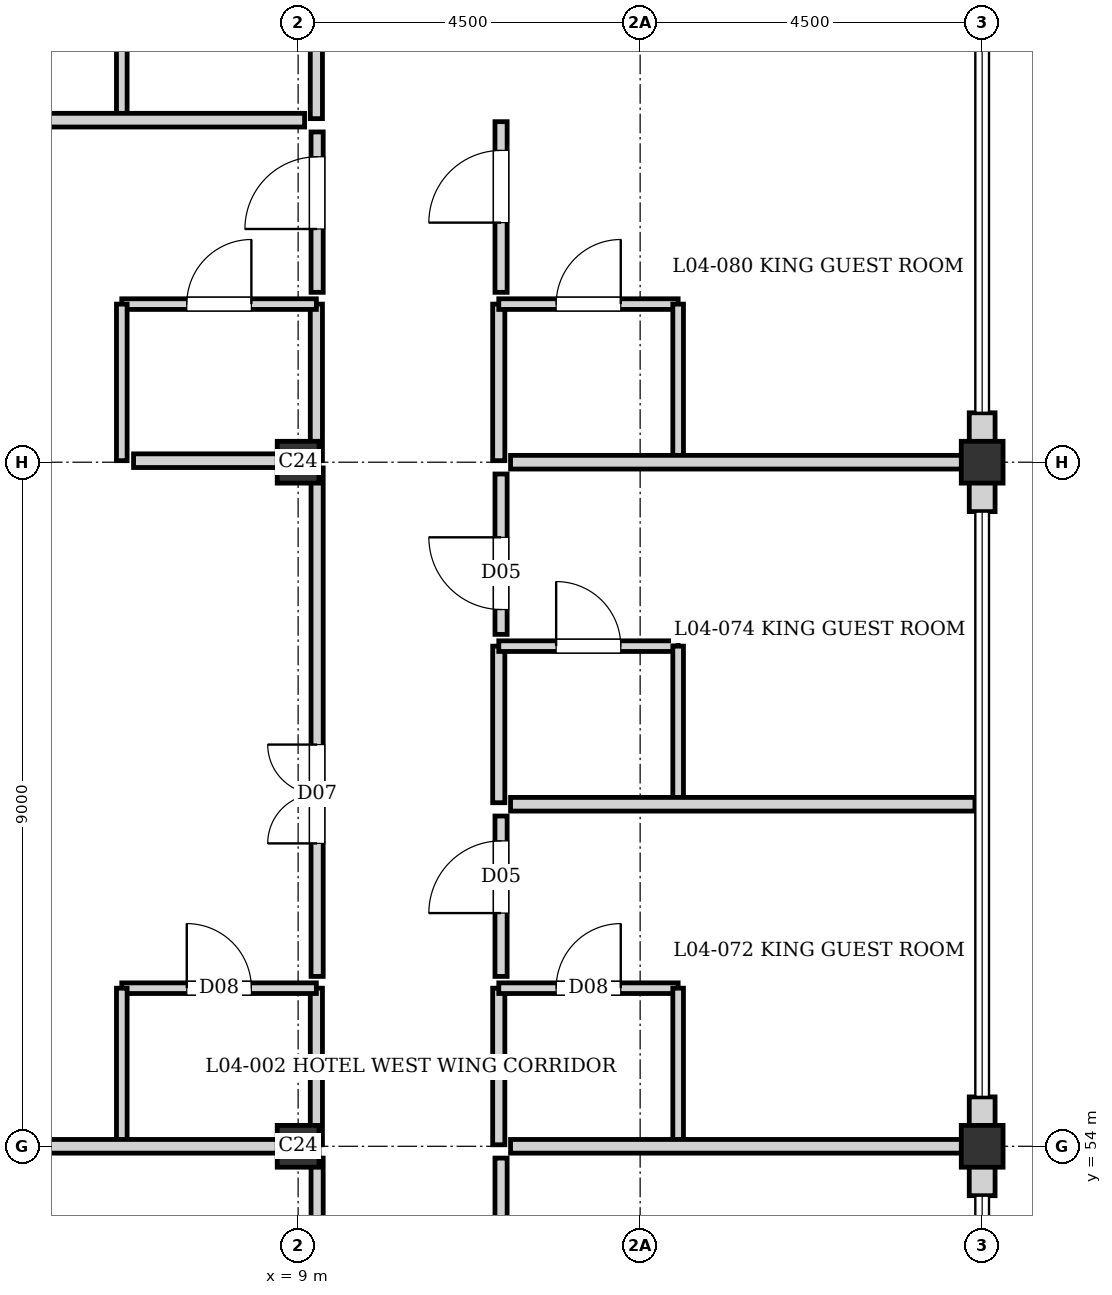
"""IFC4 building model, lengths in metres.
Left out: names, types, materials, properties, quantities, classifications, styles, units other than length and angle.
Written with IfcOpenShell. Run it as: python <this file> out.ifc"""

import sys

from ifc_helpers import new_model, si_unit, direction, frame, frame_2d, origin, origin_2d, place, context, subcontext, project, spatial, rectangle, extrude, element, fill, save


model = new_model("IFC4")
c1 = context("Model", 3, precision=1e-05, world=origin(), true_north=direction((0.0, 1.0)))
c2 = subcontext(c1, "Body", "Model", "MODEL_VIEW")
j1 = project(units=[si_unit("LENGTHUNIT", "METRE"), si_unit("PLANEANGLEUNIT", "RADIAN")], contexts=[c1])
p1 = place(None, origin())
s1 = spatial("IfcSite", under=j1, at=p1, CompositionType="ELEMENT")
p2 = place(p1, origin())
s2 = spatial("IfcBuilding", under=s1, at=p2, CompositionType="ELEMENT")
p3 = place(p2, frame((0.0, 0.0, 14.56)))
s3 = spatial("IfcBuildingStorey", under=s2, at=p3, CompositionType="ELEMENT", Elevation=14.56)
for number, where, z_axis, x_axis in (
    (1, (9.0, 54.0, 0.0), (0.0, 0.0, 1.0), (1.0, 0.0, 0.0)),
    (2, (9.0, 63.0, 0.0), (0.0, 0.0, 1.0), (1.0, 0.0, 0.0)),
    (3, (18.0, 54.0, 0.0), (0.0, 0.0, 1.0), (1.0, 0.0, 0.0)),
    (4, (18.0, 63.0, 0.0), (0.0, 0.0, 1.0), (1.0, 0.0, 0.0)),
):
    element("IfcColumn", number, at=place(p3, frame(where, z_axis=z_axis, x_axis=x_axis)), inside=s3, PredefinedType="COLUMN", context=c2, shape_type="SweptSolid", body=[
        extrude(rectangle(XDim=0.55, YDim=0.55, at=origin_2d()), origin(), (0.0, 0.0, 1.0), 3.04),
    ])
p4 = place(p3, frame((18.0, 63.65, 0.0), z_axis=(0.0, 0.0, 1.0), x_axis=(0.0, -1.0, 0.0)))
e5 = element("IfcWall", 5, at=p4, inside=s3, PredefinedType="SOLIDWALL", context=c2, shape_type="SweptSolid", body=[
    extrude(rectangle(XDim=0.65, YDim=0.34, at=frame_2d((0.325, 0.0))), origin(), (0.0, 0.0, 1.0), 2.42),
])
for number, where, z_axis, x_axis in (
    (6, (18.0, 63.0, 0.0), (0.0, 0.0, 1.0), (0.0, -1.0, 0.0)),
    (7, (18.0, 54.65, 0.0), (0.0, 0.0, 1.0), (0.0, -1.0, 0.0)),
):
    element("IfcWall", number, at=place(p3, frame(where, z_axis=z_axis, x_axis=x_axis)), inside=s3, PredefinedType="SOLIDWALL", context=c2, shape_type="SweptSolid", body=[
        extrude(rectangle(XDim=0.65, YDim=0.34, at=frame_2d((0.325, 0.0))), origin(), (0.0, 0.0, 1.0), 2.48),
    ])
p5 = place(p3, frame((18.0, 54.0, 0.0), z_axis=(0.0, 0.0, 1.0), x_axis=(0.0, -1.0, 0.0)))
e8 = element("IfcWall", 8, at=p5, inside=s3, PredefinedType="SOLIDWALL", context=c2, shape_type="SweptSolid", body=[
    extrude(rectangle(XDim=0.65, YDim=0.34, at=frame_2d((0.325, 0.0))), origin(), (0.0, 0.0, 1.0), 2.82),
])
p6 = place(p3, frame((9.24, 54.02, 0.0), z_axis=(0.0, 0.0, 1.0), x_axis=(0.0, 1.0, 0.0)))
e9 = element("IfcWall", 9, at=p6, inside=s3, PredefinedType="PARTITIONING", context=c2, shape_type="SweptSolid", body=[
    extrude(rectangle(XDim=2.06, YDim=0.16, at=frame_2d((1.03, 0.0))), origin(), (0.0, 0.0, 1.0), 2.82),
])
p7 = place(p3, frame((6.68, 56.08, 0.0), z_axis=(0.0, 0.0, 1.0), x_axis=(1.0, 0.0, 0.0)))
e10 = element("IfcWall", 10, at=p7, inside=s3, PredefinedType="PLUMBINGWALL", context=c2, shape_type="SweptSolid", body=[
    extrude(rectangle(XDim=2.56, YDim=0.14, at=frame_2d((1.28, 0.0))), origin(), (0.0, 0.0, 1.0), 2.82),
])
p8 = place(p7, frame((0.855, 0.0, 0.0)))
e11 = element("IfcOpeningElement", 11, at=p8, cuts=e10, PredefinedType="OPENING", context=c2, shape_type="SweptSolid", body=[
    extrude(rectangle(XDim=0.85, YDim=2.04, at=frame_2d((0.425, 1.02))), frame((0.0, 0.08, 0.0), z_axis=(0.0, -1.0, 0.0), x_axis=(1.0, 0.0, 0.0)), (0.0, 0.0, 1.0), 0.16),
])
p9 = place(p3, frame((6.68, 54.02, 0.0), z_axis=(0.0, 0.0, 1.0), x_axis=(0.0, 1.0, 0.0)))
e12 = element("IfcWall", 12, at=p9, inside=s3, PredefinedType="PLUMBINGWALL", context=c2, shape_type="SweptSolid", body=[
    extrude(rectangle(XDim=2.06, YDim=0.14, at=frame_2d((1.03, 0.0))), origin(), (0.0, 0.0, 1.0), 2.82),
])
p10 = place(p3, frame((11.64, 54.02, 0.0), z_axis=(0.0, 0.0, 1.0), x_axis=(0.0, 1.0, 0.0)))
e13 = element("IfcWall", 13, at=p10, inside=s3, PredefinedType="PARTITIONING", context=c2, shape_type="SweptSolid", body=[
    extrude(rectangle(XDim=2.06, YDim=0.16, at=frame_2d((1.03, 0.0))), origin(), (0.0, 0.0, 1.0), 2.82),
])
p11 = place(p3, frame((11.64, 56.08, 0.0), z_axis=(0.0, 0.0, 1.0), x_axis=(1.0, 0.0, 0.0)))
e14 = element("IfcWall", 14, at=p11, inside=s3, PredefinedType="PLUMBINGWALL", context=c2, shape_type="SweptSolid", body=[
    extrude(rectangle(XDim=2.36, YDim=0.14, at=frame_2d((1.18, 0.0))), origin(), (0.0, 0.0, 1.0), 2.82),
])
p12 = place(p11, frame((0.755, 0.0, 0.0)))
e15 = element("IfcOpeningElement", 15, at=p12, cuts=e14, PredefinedType="OPENING", context=c2, shape_type="SweptSolid", body=[
    extrude(rectangle(XDim=0.85, YDim=2.04, at=frame_2d((0.425, 1.02))), frame((0.0, 0.08, 0.0), z_axis=(0.0, -1.0, 0.0), x_axis=(1.0, 0.0, 0.0)), (0.0, 0.0, 1.0), 0.16),
])
p13 = place(p3, frame((14.0, 54.02, 0.0), z_axis=(0.0, 0.0, 1.0), x_axis=(0.0, 1.0, 0.0)))
e16 = element("IfcWall", 16, at=p13, inside=s3, PredefinedType="PLUMBINGWALL", context=c2, shape_type="SweptSolid", body=[
    extrude(rectangle(XDim=2.06, YDim=0.14, at=frame_2d((1.03, 0.0))), origin(), (0.0, 0.0, 1.0), 2.82),
])
p14 = place(p3, frame((11.64, 58.52, 0.0), z_axis=(0.0, 0.0, 1.0), x_axis=(0.0, 1.0, 0.0)))
e17 = element("IfcWall", 17, at=p14, inside=s3, PredefinedType="PARTITIONING", context=c2, shape_type="SweptSolid", body=[
    extrude(rectangle(XDim=2.06, YDim=0.16, at=frame_2d((1.03, 0.0))), origin(), (0.0, 0.0, 1.0), 2.82),
])
p15 = place(p3, frame((11.64, 60.58, 0.0), z_axis=(0.0, 0.0, 1.0), x_axis=(1.0, 0.0, 0.0)))
e18 = element("IfcWall", 18, at=p15, inside=s3, PredefinedType="PLUMBINGWALL", context=c2, shape_type="SweptSolid", body=[
    extrude(rectangle(XDim=2.36, YDim=0.14, at=frame_2d((1.18, 0.0))), origin(), (0.0, 0.0, 1.0), 2.82),
])
p16 = place(p15, frame((0.755, 0.0, 0.0)))
e19 = element("IfcOpeningElement", 19, at=p16, cuts=e18, PredefinedType="OPENING", context=c2, shape_type="SweptSolid", body=[
    extrude(rectangle(XDim=0.85, YDim=2.04, at=frame_2d((0.425, 1.02))), frame((0.0, 0.08, 0.0), z_axis=(0.0, -1.0, 0.0), x_axis=(1.0, 0.0, 0.0)), (0.0, 0.0, 1.0), 0.16),
])
p17 = place(p3, frame((14.0, 58.52, 0.0), z_axis=(0.0, 0.0, 1.0), x_axis=(0.0, 1.0, 0.0)))
e20 = element("IfcWall", 20, at=p17, inside=s3, PredefinedType="PLUMBINGWALL", context=c2, shape_type="SweptSolid", body=[
    extrude(rectangle(XDim=2.06, YDim=0.14, at=frame_2d((1.03, 0.0))), origin(), (0.0, 0.0, 1.0), 2.82),
])
p18 = place(p3, frame((9.24, 63.02, 0.0), z_axis=(0.0, 0.0, 1.0), x_axis=(0.0, 1.0, 0.0)))
e21 = element("IfcWall", 21, at=p18, inside=s3, PredefinedType="PARTITIONING", context=c2, shape_type="SweptSolid", body=[
    extrude(rectangle(XDim=2.06, YDim=0.16, at=frame_2d((1.03, 0.0))), origin(), (0.0, 0.0, 1.0), 2.82),
])
p19 = place(p3, frame((6.68, 65.08, 0.0), z_axis=(0.0, 0.0, 1.0), x_axis=(1.0, 0.0, 0.0)))
e22 = element("IfcWall", 22, at=p19, inside=s3, PredefinedType="PLUMBINGWALL", context=c2, shape_type="SweptSolid", body=[
    extrude(rectangle(XDim=2.56, YDim=0.14, at=frame_2d((1.28, 0.0))), origin(), (0.0, 0.0, 1.0), 2.82),
])
p20 = place(p19, frame((0.855, 0.0, 0.0)))
e23 = element("IfcOpeningElement", 23, at=p20, cuts=e22, PredefinedType="OPENING", context=c2, shape_type="SweptSolid", body=[
    extrude(rectangle(XDim=0.85, YDim=2.04, at=frame_2d((0.425, 1.02))), frame((0.0, 0.08, 0.0), z_axis=(0.0, -1.0, 0.0), x_axis=(1.0, 0.0, 0.0)), (0.0, 0.0, 1.0), 0.16),
])
p21 = place(p3, frame((6.68, 63.02, 0.0), z_axis=(0.0, 0.0, 1.0), x_axis=(0.0, 1.0, 0.0)))
e24 = element("IfcWall", 24, at=p21, inside=s3, PredefinedType="PLUMBINGWALL", context=c2, shape_type="SweptSolid", body=[
    extrude(rectangle(XDim=2.06, YDim=0.14, at=frame_2d((1.03, 0.0))), origin(), (0.0, 0.0, 1.0), 2.82),
])
p22 = place(p3, frame((9.24, 67.52, 0.0), z_axis=(0.0, 0.0, 1.0), x_axis=(0.0, 1.0, 0.0)))
e25 = element("IfcWall", 25, at=p22, inside=s3, PredefinedType="PARTITIONING", context=c2, shape_type="SweptSolid", body=[
    extrude(rectangle(XDim=2.06, YDim=0.16, at=frame_2d((1.03, 0.0))), origin(), (0.0, 0.0, 1.0), 2.82),
])
p23 = place(p3, frame((6.68, 67.52, 0.0), z_axis=(0.0, 0.0, 1.0), x_axis=(0.0, 1.0, 0.0)))
e26 = element("IfcWall", 26, at=p23, inside=s3, PredefinedType="PLUMBINGWALL", context=c2, shape_type="SweptSolid", body=[
    extrude(rectangle(XDim=2.06, YDim=0.14, at=frame_2d((1.03, 0.0))), origin(), (0.0, 0.0, 1.0), 2.82),
])
p24 = place(p3, frame((11.64, 63.02, 0.0), z_axis=(0.0, 0.0, 1.0), x_axis=(0.0, 1.0, 0.0)))
e27 = element("IfcWall", 27, at=p24, inside=s3, PredefinedType="PARTITIONING", context=c2, shape_type="SweptSolid", body=[
    extrude(rectangle(XDim=2.06, YDim=0.16, at=frame_2d((1.03, 0.0))), origin(), (0.0, 0.0, 1.0), 2.82),
])
p25 = place(p3, frame((11.64, 65.08, 0.0), z_axis=(0.0, 0.0, 1.0), x_axis=(1.0, 0.0, 0.0)))
e28 = element("IfcWall", 28, at=p25, inside=s3, PredefinedType="PLUMBINGWALL", context=c2, shape_type="SweptSolid", body=[
    extrude(rectangle(XDim=2.36, YDim=0.14, at=frame_2d((1.18, 0.0))), origin(), (0.0, 0.0, 1.0), 2.82),
])
p26 = place(p25, frame((0.755, 0.0, 0.0)))
e29 = element("IfcOpeningElement", 29, at=p26, cuts=e28, PredefinedType="OPENING", context=c2, shape_type="SweptSolid", body=[
    extrude(rectangle(XDim=0.85, YDim=2.04, at=frame_2d((0.425, 1.02))), frame((0.0, 0.08, 0.0), z_axis=(0.0, -1.0, 0.0), x_axis=(1.0, 0.0, 0.0)), (0.0, 0.0, 1.0), 0.16),
])
p27 = place(p3, frame((14.0, 63.02, 0.0), z_axis=(0.0, 0.0, 1.0), x_axis=(0.0, 1.0, 0.0)))
e30 = element("IfcWall", 30, at=p27, inside=s3, PredefinedType="PLUMBINGWALL", context=c2, shape_type="SweptSolid", body=[
    extrude(rectangle(XDim=2.06, YDim=0.14, at=frame_2d((1.03, 0.0))), origin(), (0.0, 0.0, 1.0), 2.82),
])
p28 = place(p3, frame((0.195, 54.0, 0.0), z_axis=(0.0, 0.0, 1.0), x_axis=(1.0, 0.0, 0.0)))
e31 = element("IfcWall", 31, at=p28, inside=s3, PredefinedType="PARTITIONING", context=c2, shape_type="SweptSolid", body=[
    extrude(rectangle(XDim=8.89, YDim=0.18, at=frame_2d((4.445, 0.0))), origin(), (0.0, 0.0, 1.0), 2.42),
])
p29 = place(p3, frame((11.795, 54.0, 0.0), z_axis=(0.0, 0.0, 1.0), x_axis=(1.0, 0.0, 0.0)))
e32 = element("IfcWall", 32, at=p29, inside=s3, PredefinedType="PARTITIONING", context=c2, shape_type="SweptSolid", body=[
    extrude(rectangle(XDim=6.03, YDim=0.18, at=frame_2d((3.015, 0.0))), origin(), (0.0, 0.0, 1.0), 2.38),
])
p30 = place(p3, frame((11.795, 58.5, 0.0), z_axis=(0.0, 0.0, 1.0), x_axis=(1.0, 0.0, 0.0)))
e33 = element("IfcWall", 33, at=p30, inside=s3, PredefinedType="PARTITIONING", context=c2, shape_type="SweptSolid", body=[
    extrude(rectangle(XDim=6.11, YDim=0.18, at=frame_2d((3.055, 0.0))), origin(), (0.0, 0.0, 1.0), 2.82),
])
p31 = place(p3, frame((11.795, 63.0, 0.0), z_axis=(0.0, 0.0, 1.0), x_axis=(1.0, 0.0, 0.0)))
e34 = element("IfcWall", 34, at=p31, inside=s3, PredefinedType="PARTITIONING", context=c2, shape_type="SweptSolid", body=[
    extrude(rectangle(XDim=6.03, YDim=0.18, at=frame_2d((3.015, 0.0))), origin(), (0.0, 0.0, 1.0), 2.38),
])
p32 = place(p3, frame((0.095, 67.5, 0.0), z_axis=(0.0, 0.0, 1.0), x_axis=(1.0, 0.0, 0.0)))
e35 = element("IfcWall", 35, at=p32, inside=s3, PredefinedType="PARTITIONING", context=c2, shape_type="SweptSolid", body=[
    extrude(rectangle(XDim=8.99, YDim=0.18, at=frame_2d((4.495, 0.0))), origin(), (0.0, 0.0, 1.0), 2.82),
])
p33 = place(p3, frame((6.835, 63.02, 0.0), z_axis=(0.0, 0.0, 1.0), x_axis=(1.0, 0.0, 0.0)))
e36 = element("IfcWall", 36, at=p33, inside=s3, PredefinedType="PARTITIONING", context=c2, shape_type="SweptSolid", body=[
    extrude(rectangle(XDim=2.25, YDim=0.18, at=frame_2d((1.125, 0.0))), origin(), (0.0, 0.0, 1.0), 2.42),
])
p34 = place(p3, frame((9.25, 51.735, 0.0), z_axis=(0.0, 0.0, 1.0), x_axis=(0.0, 1.0, 0.0)))
e37 = element("IfcWall", 37, at=p34, inside=s3, PredefinedType="PARTITIONING", context=c2, shape_type="SweptSolid", body=[
    extrude(rectangle(XDim=2.11, YDim=0.16, at=frame_2d((1.055, 0.0))), origin(), (0.0, 0.0, 1.0), 2.82),
])
p35 = place(p34, frame((0.327, 0.0, 0.0)))
e38 = element("IfcOpeningElement", 38, at=p35, cuts=e37, PredefinedType="OPENING", context=c2, shape_type="SweptSolid", body=[
    extrude(rectangle(XDim=0.95, YDim=2.15, at=frame_2d((0.475, 1.075))), frame((0.0, 0.09, 0.0), z_axis=(0.0, -1.0, 0.0), x_axis=(1.0, 0.0, 0.0)), (0.0, 0.0, 1.0), 0.18),
])
p36 = place(p3, frame((11.67, 51.735, 0.0), z_axis=(0.0, 0.0, 1.0), x_axis=(0.0, 1.0, 0.0)))
e39 = element("IfcWall", 39, at=p36, inside=s3, PredefinedType="PARTITIONING", context=c2, shape_type="SweptSolid", body=[
    extrude(rectangle(XDim=2.11, YDim=0.16, at=frame_2d((1.055, 0.0))), origin(), (0.0, 0.0, 1.0), 2.82),
])
p37 = place(p36, frame((0.327, 0.0, 0.0)))
e40 = element("IfcOpeningElement", 40, at=p37, cuts=e39, PredefinedType="OPENING", context=c2, shape_type="SweptSolid", body=[
    extrude(rectangle(XDim=0.95, YDim=2.15, at=frame_2d((0.475, 1.075))), frame((0.0, 0.09, 0.0), z_axis=(0.0, -1.0, 0.0), x_axis=(1.0, 0.0, 0.0)), (0.0, 0.0, 1.0), 0.18),
])
p38 = place(p3, frame((9.25, 56.235, 0.0), z_axis=(0.0, 0.0, 1.0), x_axis=(0.0, 1.0, 0.0)))
e41 = element("IfcWall", 41, at=p38, inside=s3, PredefinedType="PARTITIONING", context=c2, shape_type="SweptSolid", body=[
    extrude(rectangle(XDim=6.69, YDim=0.16, at=frame_2d((3.345, 0.0))), origin(), (0.0, 0.0, 1.0), 2.82),
])
p39 = place(p38, frame((1.75, 0.0, 0.0)))
e42 = element("IfcOpeningElement", 42, at=p39, cuts=e41, PredefinedType="OPENING", context=c2, shape_type="SweptSolid", body=[
    extrude(rectangle(XDim=1.3, YDim=2.25, at=frame_2d((0.65, 1.125))), frame((0.0, 0.09, 0.0), z_axis=(0.0, -1.0, 0.0), x_axis=(1.0, 0.0, 0.0)), (0.0, 0.0, 1.0), 0.18),
])
p40 = place(p3, frame((11.67, 56.235, 0.0), z_axis=(0.0, 0.0, 1.0), x_axis=(0.0, 1.0, 0.0)))
e43 = element("IfcWall", 43, at=p40, inside=s3, PredefinedType="PARTITIONING", context=c2, shape_type="SweptSolid", body=[
    extrude(rectangle(XDim=2.11, YDim=0.16, at=frame_2d((1.055, 0.0))), origin(), (0.0, 0.0, 1.0), 2.82),
])
p41 = place(p40, frame((0.833, 0.0, 0.0)))
e44 = element("IfcOpeningElement", 44, at=p41, cuts=e43, PredefinedType="OPENING", context=c2, shape_type="SweptSolid", body=[
    extrude(rectangle(XDim=0.95, YDim=2.15, at=frame_2d((0.475, 1.075))), frame((0.0, 0.09, 0.0), z_axis=(0.0, -1.0, 0.0), x_axis=(1.0, 0.0, 0.0)), (0.0, 0.0, 1.0), 0.18),
])
p42 = place(p3, frame((11.67, 60.735, 0.0), z_axis=(0.0, 0.0, 1.0), x_axis=(0.0, 1.0, 0.0)))
e45 = element("IfcWall", 45, at=p42, inside=s3, PredefinedType="PARTITIONING", context=c2, shape_type="SweptSolid", body=[
    extrude(rectangle(XDim=2.11, YDim=0.16, at=frame_2d((1.055, 0.0))), origin(), (0.0, 0.0, 1.0), 2.82),
])
p43 = place(p42, frame((0.327, 0.0, 0.0)))
e46 = element("IfcOpeningElement", 46, at=p43, cuts=e45, PredefinedType="OPENING", context=c2, shape_type="SweptSolid", body=[
    extrude(rectangle(XDim=0.95, YDim=2.15, at=frame_2d((0.475, 1.075))), frame((0.0, 0.09, 0.0), z_axis=(0.0, -1.0, 0.0), x_axis=(1.0, 0.0, 0.0)), (0.0, 0.0, 1.0), 0.18),
])
p44 = place(p3, frame((9.25, 65.235, 0.0), z_axis=(0.0, 0.0, 1.0), x_axis=(0.0, 1.0, 0.0)))
e47 = element("IfcWall", 47, at=p44, inside=s3, PredefinedType="PARTITIONING", context=c2, shape_type="SweptSolid", body=[
    extrude(rectangle(XDim=2.11, YDim=0.16, at=frame_2d((1.055, 0.0))), origin(), (0.0, 0.0, 1.0), 2.82),
])
p45 = place(p44, frame((0.833, 0.0, 0.0)))
e48 = element("IfcOpeningElement", 48, at=p45, cuts=e47, PredefinedType="OPENING", context=c2, shape_type="SweptSolid", body=[
    extrude(rectangle(XDim=0.95, YDim=2.15, at=frame_2d((0.475, 1.075))), frame((0.0, 0.09, 0.0), z_axis=(0.0, -1.0, 0.0), x_axis=(1.0, 0.0, 0.0)), (0.0, 0.0, 1.0), 0.18),
])
p46 = place(p3, frame((11.67, 65.235, 0.0), z_axis=(0.0, 0.0, 1.0), x_axis=(0.0, 1.0, 0.0)))
e49 = element("IfcWall", 49, at=p46, inside=s3, PredefinedType="PARTITIONING", context=c2, shape_type="SweptSolid", body=[
    extrude(rectangle(XDim=2.245, YDim=0.16, at=frame_2d((1.123, 0.0))), origin(), (0.0, 0.0, 1.0), 2.82),
])
p47 = place(p46, frame((0.917, 0.0, 0.0)))
e50 = element("IfcOpeningElement", 50, at=p47, cuts=e49, PredefinedType="OPENING", context=c2, shape_type="SweptSolid", body=[
    extrude(rectangle(XDim=0.95, YDim=2.15, at=frame_2d((0.475, 1.075))), frame((0.0, 0.09, 0.0), z_axis=(0.0, -1.0, 0.0), x_axis=(1.0, 0.0, 0.0)), (0.0, 0.0, 1.0), 0.18),
])
p48 = place(p8, origin())
e51 = element("IfcDoor", 51, at=p48, inside=s3, OperationType="SINGLE_SWING_LEFT", PredefinedType="DOOR", context=c2, shape_type="SweptSolid", body=[
    extrude(rectangle(XDim=0.85, YDim=2.04, at=frame_2d((0.425, 1.02))), frame((0.0, 0.025, 0.0), z_axis=(0.0, -1.0, 0.0), x_axis=(1.0, 0.0, 0.0)), (0.0, 0.0, 1.0), 0.05),
])
fill(e11, e51)
p49 = place(p12, origin())
e52 = element("IfcDoor", 52, at=p49, inside=s3, OperationType="SINGLE_SWING_RIGHT", PredefinedType="DOOR", context=c2, shape_type="SweptSolid", body=[
    extrude(rectangle(XDim=0.85, YDim=2.04, at=frame_2d((0.425, 1.02))), frame((0.0, 0.025, 0.0), z_axis=(0.0, -1.0, 0.0), x_axis=(1.0, 0.0, 0.0)), (0.0, 0.0, 1.0), 0.05),
])
fill(e15, e52)
p50 = place(p16, origin())
e53 = element("IfcDoor", 53, at=p50, inside=s3, OperationType="SINGLE_SWING_LEFT", PredefinedType="DOOR", context=c2, shape_type="SweptSolid", body=[
    extrude(rectangle(XDim=0.85, YDim=2.04, at=frame_2d((0.425, 1.02))), frame((0.0, 0.025, 0.0), z_axis=(0.0, -1.0, 0.0), x_axis=(1.0, 0.0, 0.0)), (0.0, 0.0, 1.0), 0.05),
])
fill(e19, e53)
p51 = place(p20, origin())
e54 = element("IfcDoor", 54, at=p51, inside=s3, OperationType="SINGLE_SWING_RIGHT", PredefinedType="DOOR", context=c2, shape_type="SweptSolid", body=[
    extrude(rectangle(XDim=0.85, YDim=2.04, at=frame_2d((0.425, 1.02))), frame((0.0, 0.025, 0.0), z_axis=(0.0, -1.0, 0.0), x_axis=(1.0, 0.0, 0.0)), (0.0, 0.0, 1.0), 0.05),
])
fill(e23, e54)
p52 = place(p26, origin())
e55 = element("IfcDoor", 55, at=p52, inside=s3, OperationType="SINGLE_SWING_RIGHT", PredefinedType="DOOR", context=c2, shape_type="SweptSolid", body=[
    extrude(rectangle(XDim=0.85, YDim=2.04, at=frame_2d((0.425, 1.02))), frame((0.0, 0.025, 0.0), z_axis=(0.0, -1.0, 0.0), x_axis=(1.0, 0.0, 0.0)), (0.0, 0.0, 1.0), 0.05),
])
fill(e29, e55)
p53 = place(p39, origin())
e56 = element("IfcDoor", 56, at=p53, inside=s3, OperationType="DOUBLE_DOOR_SINGLE_SWING", PredefinedType="DOOR", context=c2, shape_type="SweptSolid", body=[
    extrude(rectangle(XDim=1.3, YDim=2.25, at=frame_2d((0.65, 1.125))), frame((0.0, 0.025, 0.0), z_axis=(0.0, -1.0, 0.0), x_axis=(1.0, 0.0, 0.0)), (0.0, 0.0, 1.0), 0.05),
])
fill(e42, e56)
p54 = place(p41, origin())
e57 = element("IfcDoor", 57, at=p54, inside=s3, OperationType="SINGLE_SWING_LEFT", PredefinedType="DOOR", context=c2, shape_type="SweptSolid", body=[
    extrude(rectangle(XDim=0.95, YDim=2.15, at=frame_2d((0.475, 1.075))), frame((0.0, 0.025, 0.0), z_axis=(0.0, -1.0, 0.0), x_axis=(1.0, 0.0, 0.0)), (0.0, 0.0, 1.0), 0.05),
])
fill(e44, e57)
p55 = place(p43, origin())
e58 = element("IfcDoor", 58, at=p55, inside=s3, OperationType="SINGLE_SWING_RIGHT", PredefinedType="DOOR", context=c2, shape_type="SweptSolid", body=[
    extrude(rectangle(XDim=0.95, YDim=2.15, at=frame_2d((0.475, 1.075))), frame((0.0, 0.025, 0.0), z_axis=(0.0, -1.0, 0.0), x_axis=(1.0, 0.0, 0.0)), (0.0, 0.0, 1.0), 0.05),
])
fill(e46, e58)
p56 = place(p45, origin())
e59 = element("IfcDoor", 59, at=p56, inside=s3, OperationType="SINGLE_SWING_LEFT", PredefinedType="DOOR", context=c2, shape_type="SweptSolid", body=[
    extrude(rectangle(XDim=0.95, YDim=2.15, at=frame_2d((0.475, 1.075))), frame((0.0, 0.025, 0.0), z_axis=(0.0, -1.0, 0.0), x_axis=(1.0, 0.0, 0.0)), (0.0, 0.0, 1.0), 0.05),
])
fill(e48, e59)
p57 = place(p47, origin())
e60 = element("IfcDoor", 60, at=p57, inside=s3, OperationType="SINGLE_SWING_LEFT", PredefinedType="DOOR", context=c2, shape_type="SweptSolid", body=[
    extrude(rectangle(XDim=0.95, YDim=2.15, at=frame_2d((0.475, 1.075))), frame((0.0, 0.025, 0.0), z_axis=(0.0, -1.0, 0.0), x_axis=(1.0, 0.0, 0.0)), (0.0, 0.0, 1.0), 0.05),
])
fill(e50, e60)
save(model, sys.argv[1])
